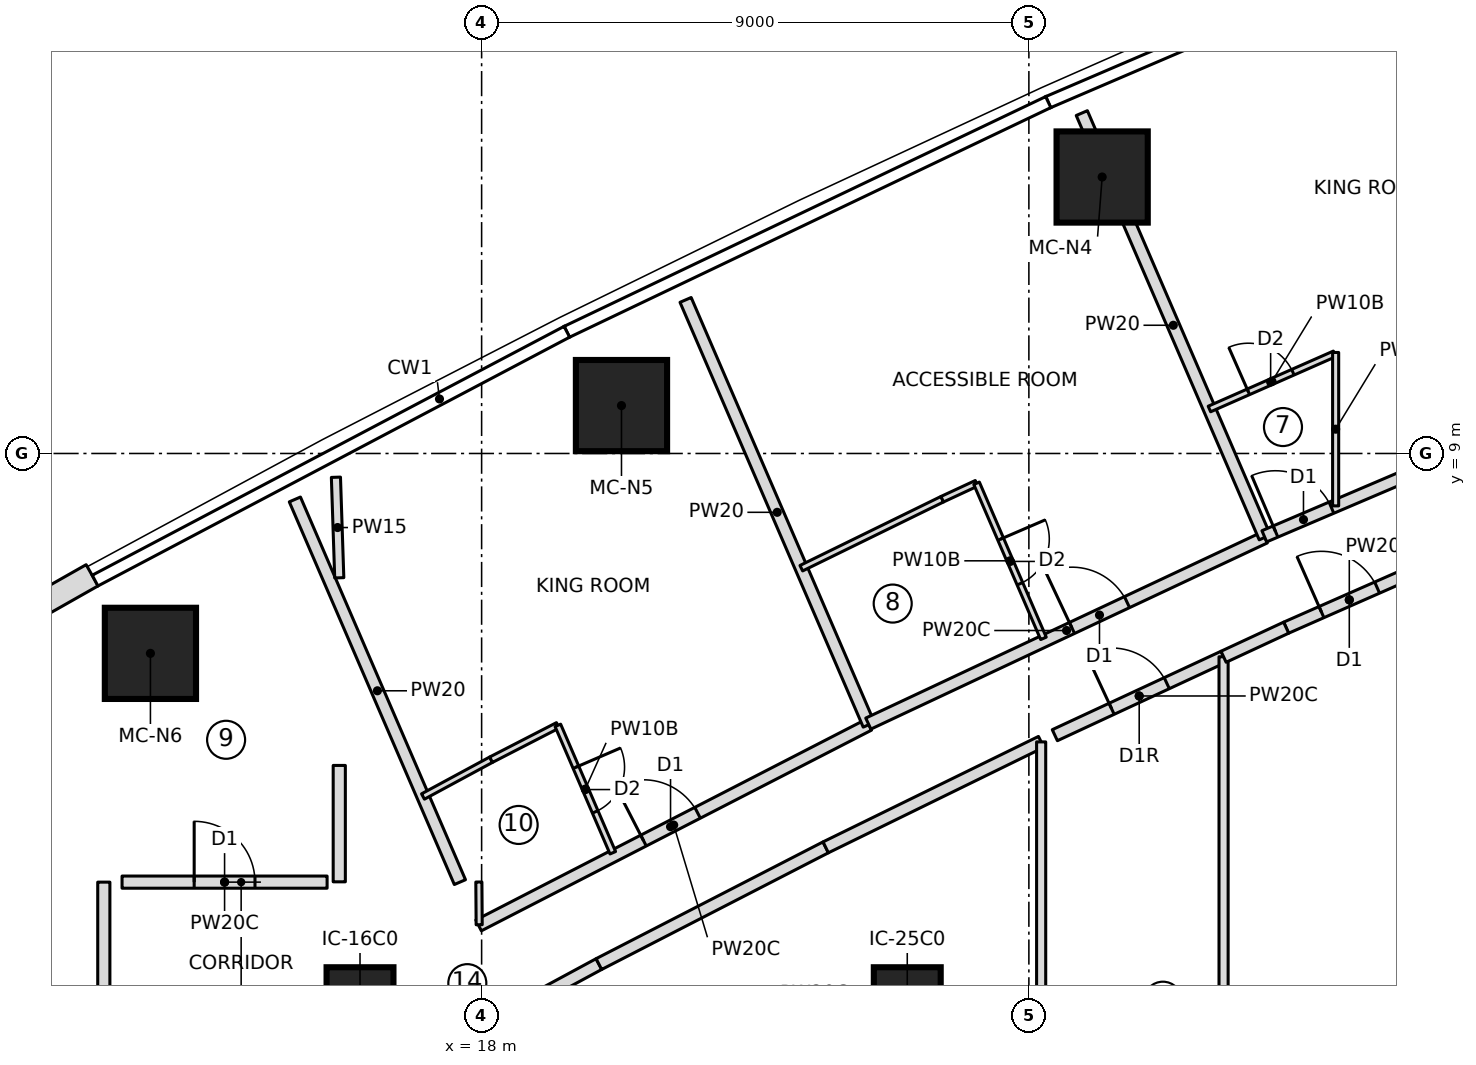
"""IFC4 building model, lengths in metres.
Left out: names, types, materials, properties, quantities, classifications, styles, units other than length and angle.
Written with IfcOpenShell. Run it as: python <this file> out.ifc"""

import sys

from ifc_helpers import new_model, si_unit, direction, frame, frame_2d, origin, origin_2d, place, context, subcontext, project, spatial, polyline, rectangle, outline, extrude, element, fill, save


model = new_model("IFC4")
c1 = context("Model", 3, precision=1e-05, world=origin(), true_north=direction((0.0, 1.0)))
c2 = subcontext(c1, "Body", "Model", "MODEL_VIEW")
j1 = project(units=[si_unit("LENGTHUNIT", "METRE"), si_unit("PLANEANGLEUNIT", "RADIAN")], contexts=[c1])
p1 = place(None, origin())
s1 = spatial("IfcSite", under=j1, at=p1, CompositionType="ELEMENT")
p2 = place(p1, origin())
s2 = spatial("IfcBuilding", under=s1, at=p2, CompositionType="ELEMENT")
p3 = place(p2, frame((0.0, 0.0, 137.3)))
s3 = spatial("IfcBuildingStorey", under=s2, at=p3, CompositionType="ELEMENT", Elevation=137.3)
for number, where, z_axis, x_axis in (
    (1, (28.205, 13.547, 0.0), (0.0, 0.0, 1.0), (1.0, 0.0, 0.0)),
    (2, (20.3, 9.788, 0.0), (0.0, 0.0, 1.0), (1.0, 0.0, 0.0)),
    (3, (12.553, 5.713, 0.0), (0.0, 0.0, 1.0), (1.0, 0.0, 0.0)),
):
    element("IfcColumn", number, at=place(p3, frame(where, z_axis=z_axis, x_axis=x_axis)), inside=s3, PredefinedType="COLUMN", context=c2, shape_type="SweptSolid", body=[
        extrude(rectangle(XDim=1.5, YDim=1.5, at=origin_2d()), origin(), (0.0, 0.0, 1.0), 3.55),
    ])
for number, where, z_axis, x_axis in (
    (4, (16.0, 0.0, 0.0), (0.0, 0.0, 1.0), (1.0, 0.0, 0.0)),
    (5, (25.0, 0.0, 0.0), (0.0, 0.0, 1.0), (1.0, 0.0, 0.0)),
):
    element("IfcColumn", number, at=place(p3, frame(where, z_axis=z_axis, x_axis=x_axis)), inside=s3, PredefinedType="COLUMN", context=c2, shape_type="SweptSolid", body=[
        extrude(rectangle(XDim=1.1, YDim=1.1, at=origin_2d()), origin(), (0.0, 0.0, 1.0), 3.55),
    ])
p4 = place(p3, frame((11.594, 6.997, 0.0), z_axis=(0.0, 0.0, 1.0), x_axis=(-0.870045255208, -0.492971859125, 0.0)))
e6 = element("IfcWall", 6, at=p4, inside=s3, PredefinedType="NOTDEFINED", context=c2, shape_type="SweptSolid", body=[
    extrude(outline(polyline([(0.0, -0.2), (4.424, -0.2), (4.352, 0.2), (0.0, 0.2), (0.0, -0.2)])), origin(), (0.0, 0.0, 1.0), 3.25),
])
p5 = place(p4, frame((1.094, 0.0, 0.6)))
e7 = element("IfcOpeningElement", 7, at=p5, cuts=e6, PredefinedType="OPENING", context=c2, shape_type="SweptSolid", body=[
    extrude(outline(polyline([(0.0, 1.35), (0.084, 1.771), (0.322, 2.128), (0.679, 2.366), (1.1, 2.45), (1.521, 2.366), (1.878, 2.128), (2.116, 1.771), (2.2, 1.35), (2.2, 1.1), (2.116, 0.679), (1.878, 0.322), (1.521, 0.084), (1.1, 0.0), (0.679, 0.084), (0.322, 0.322), (0.084, 0.679), (0.0, 1.1), (0.0, 1.35)])), frame((0.0, 0.21, 0.0), z_axis=(0.0, -1.0, 0.0), x_axis=(1.0, 0.0, 0.0)), (0.0, 0.0, 1.0), 0.42),
])
p6 = place(p3, frame((12.087, 1.95, 0.0), z_axis=(0.0, 0.0, 1.0), x_axis=(1.0, 0.0, 0.0)))
e8 = element("IfcWall", 8, at=p6, inside=s3, PredefinedType="PARTITIONING", context=c2, shape_type="SweptSolid", body=[
    extrude(rectangle(XDim=3.372, YDim=0.2, at=frame_2d((1.686, 0.0))), origin(), (0.0, 0.0, 1.0), 3.25),
])
p7 = place(p6, frame((1.186, 0.0, 0.0)))
e9 = element("IfcOpeningElement", 9, at=p7, cuts=e8, PredefinedType="OPENING", context=c2, shape_type="SweptSolid", body=[
    extrude(rectangle(XDim=1.0, YDim=2.1, at=frame_2d((0.5, 1.05))), frame((0.0, 0.11, 0.0), z_axis=(0.0, -1.0, 0.0), x_axis=(1.0, 0.0, 0.0)), (0.0, 0.0, 1.0), 0.22),
])
p8 = place(p3, frame((11.787, -1.95, 0.0), z_axis=(0.0, 0.0, 1.0), x_axis=(0.0, 1.0, 0.0)))
e10 = element("IfcWall", 10, at=p8, inside=s3, PredefinedType="PARTITIONING", context=c2, shape_type="SweptSolid", body=[
    extrude(rectangle(XDim=3.9, YDim=0.2, at=frame_2d((1.95, 0.0))), origin(), (0.0, 0.0, 1.0), 3.25),
])
p9 = place(p8, frame((0.4, 0.0, 0.0)))
e11 = element("IfcOpeningElement", 11, at=p9, cuts=e10, PredefinedType="OPENING", context=c2, shape_type="SweptSolid", body=[
    extrude(rectangle(XDim=1.0, YDim=2.1, at=frame_2d((0.5, 1.05))), frame((0.0, 0.11, 0.0), z_axis=(0.0, -1.0, 0.0), x_axis=(1.0, 0.0, 0.0)), (0.0, 0.0, 1.0), 0.22),
])
p10 = place(p3, frame((17.643, 1.95, 0.0), z_axis=(0.0, 0.0, 1.0), x_axis=(-0.395994543879, 0.918252863441, 0.0)))
e12 = element("IfcWall", 12, at=p10, inside=s3, PredefinedType="PARTITIONING", context=c2, shape_type="SweptSolid", body=[
    extrude(rectangle(XDim=6.854, YDim=0.2, at=frame_2d((3.427, 0.0))), origin(), (0.0, 0.0, 1.0), 3.25),
])
p11 = place(p3, frame((17.95, 1.238, 0.0), z_axis=(0.0, 0.0, 1.0), x_axis=(0.889253598622, 0.457414513694, 0.0)))
e13 = element("IfcWall", 13, at=p11, inside=s3, PredefinedType="PARTITIONING", context=c2, shape_type="SweptSolid", body=[
    extrude(rectangle(XDim=7.217, YDim=0.2, at=frame_2d((3.608, 0.0))), origin(), (0.0, 0.0, 1.0), 3.25),
])
p12 = place(p11, frame((3.05, 0.0, 0.0)))
e14 = element("IfcOpeningElement", 14, at=p12, cuts=e13, PredefinedType="OPENING", context=c2, shape_type="SweptSolid", body=[
    extrude(rectangle(XDim=1.0, YDim=2.1, at=frame_2d((0.5, 1.05))), frame((0.0, 0.11, 0.0), z_axis=(0.0, -1.0, 0.0), x_axis=(1.0, 0.0, 0.0)), (0.0, 0.0, 1.0), 0.22),
])
p13 = place(p3, frame((17.036, 3.358, 0.0), z_axis=(0.0, 0.0, 1.0), x_axis=(0.879823588489, 0.475300382009, 0.0)))
e15 = element("IfcWall", 15, at=p13, inside=s3, PredefinedType="PARTITIONING", context=c2, shape_type="SweptSolid", body=[
    extrude(rectangle(XDim=1.273, YDim=0.1, at=frame_2d((0.636, 0.0))), origin(), (0.0, 0.0, 1.0), 3.25),
])
p14 = place(p3, frame((18.156, 3.963, 0.0), z_axis=(0.0, 0.0, 1.0), x_axis=(0.889106231322, 0.457700895154, 0.0)))
e16 = element("IfcWall", 16, at=p14, inside=s3, PredefinedType="PARTITIONING", context=c2, shape_type="SweptSolid", body=[
    extrude(rectangle(XDim=1.235, YDim=0.1, at=frame_2d((0.617, 0.0))), origin(), (0.0, 0.0, 1.0), 3.25),
])
p15 = place(p3, frame((19.254, 4.529, 0.0), z_axis=(0.0, 0.0, 1.0), x_axis=(0.395958457437, -0.9182684248, 0.0)))
e17 = element("IfcWall", 17, at=p15, inside=s3, PredefinedType="PARTITIONING", context=c2, shape_type="SweptSolid", body=[
    extrude(rectangle(XDim=2.282, YDim=0.1, at=frame_2d((1.141, 0.0))), origin(), (0.0, 0.0, 1.0), 3.25),
])
p16 = place(p15, frame((0.75, 0.0, 0.0)))
e18 = element("IfcOpeningElement", 18, at=p16, cuts=e17, PredefinedType="OPENING", context=c2, shape_type="SweptSolid", body=[
    extrude(rectangle(XDim=0.8, YDim=2.1, at=frame_2d((0.4, 1.05))), frame((0.0, 0.06, 0.0), z_axis=(0.0, -1.0, 0.0), x_axis=(1.0, 0.0, 0.0)), (0.0, 0.0, 1.0), 0.12),
])
p17 = place(p3, frame((24.367, 4.539, 0.0), z_axis=(0.0, 0.0, 1.0), x_axis=(-0.395982367396, 0.918258114427, 0.0)))
e19 = element("IfcWall", 19, at=p17, inside=s3, PredefinedType="PARTITIONING", context=c2, shape_type="SweptSolid", body=[
    extrude(rectangle(XDim=7.609, YDim=0.2, at=frame_2d((3.804, 0.0))), origin(), (0.0, 0.0, 1.0), 3.25),
])
p18 = place(p3, frame((24.36, 4.557, 0.0), z_axis=(0.0, 0.0, 1.0), x_axis=(0.905157912263, 0.425075468439, 0.0)))
e20 = element("IfcWall", 20, at=p18, inside=s3, PredefinedType="PARTITIONING", context=c2, shape_type="SweptSolid", body=[
    extrude(rectangle(XDim=7.203, YDim=0.2, at=frame_2d((3.602, 0.0))), origin(), (0.0, 0.0, 1.0), 3.25),
])
p19 = place(p18, frame((3.7, 0.0, 0.0)))
e21 = element("IfcOpeningElement", 21, at=p19, cuts=e20, PredefinedType="OPENING", context=c2, shape_type="SweptSolid", body=[
    extrude(rectangle(XDim=1.0, YDim=2.1, at=frame_2d((0.5, 1.05))), frame((0.0, 0.11, 0.0), z_axis=(0.0, -1.0, 0.0), x_axis=(1.0, 0.0, 0.0)), (0.0, 0.0, 1.0), 0.22),
])
p20 = place(p3, frame((23.257, 7.113, 0.0), z_axis=(0.0, 0.0, 1.0), x_axis=(0.89814200952, 0.439705504555, 0.0)))
e22 = element("IfcWall", 22, at=p20, inside=s3, PredefinedType="PARTITIONING", context=c2, shape_type="SweptSolid", body=[
    extrude(rectangle(XDim=2.581, YDim=0.1, at=frame_2d((1.291, 0.0))), origin(), (0.0, 0.0, 1.0), 3.25),
])
p21 = place(p3, frame((25.575, 8.248, 0.0), z_axis=(0.0, 0.0, 1.0), x_axis=(0.906923333349, 0.421295700699, 0.0)))
e23 = element("IfcWall", 23, at=p21, inside=s3, PredefinedType="PARTITIONING", context=c2, shape_type="SweptSolid", body=[
    extrude(rectangle(XDim=0.622, YDim=0.1, at=frame_2d((0.311, 0.0))), origin(), (0.0, 0.0, 1.0), 3.25),
])
p22 = place(p3, frame((26.14, 8.51, 0.0), z_axis=(0.0, 0.0, 1.0), x_axis=(0.396018464604, -0.918242547311, 0.0)))
e24 = element("IfcWall", 24, at=p22, inside=s3, PredefinedType="PARTITIONING", context=c2, shape_type="SweptSolid", body=[
    extrude(rectangle(XDim=2.778, YDim=0.1, at=frame_2d((1.389, 0.0))), origin(), (0.0, 0.0, 1.0), 3.25),
])
p23 = place(p22, frame((1.0, 0.0, 0.0)))
e25 = element("IfcOpeningElement", 25, at=p23, cuts=e24, PredefinedType="OPENING", context=c2, shape_type="SweptSolid", body=[
    extrude(rectangle(XDim=0.8, YDim=2.1, at=frame_2d((0.4, 1.05))), frame((0.0, 0.06, 0.0), z_axis=(0.0, -1.0, 0.0), x_axis=(1.0, 0.0, 0.0)), (0.0, 0.0, 1.0), 0.12),
])
p24 = place(p3, frame((30.88, 7.619, 0.0), z_axis=(0.0, 0.0, 1.0), x_axis=(-0.395976934703, 0.91826045716, 0.0)))
e26 = element("IfcWall", 26, at=p24, inside=s3, PredefinedType="PARTITIONING", context=c2, shape_type="SweptSolid", body=[
    extrude(rectangle(XDim=7.6, YDim=0.2, at=frame_2d((3.8, 0.0))), origin(), (0.0, 0.0, 1.0), 3.25),
])
p25 = place(p3, frame((30.872, 7.638, 0.0), z_axis=(0.0, 0.0, 1.0), x_axis=(0.919834621271, 0.392306346509, 0.0)))
e27 = element("IfcWall", 27, at=p25, inside=s3, PredefinedType="PARTITIONING", context=c2, shape_type="SweptSolid", body=[
    extrude(rectangle(XDim=7.2, YDim=0.2, at=frame_2d((3.6, 0.0))), origin(), (0.0, 0.0, 1.0), 3.25),
])
p26 = place(p25, frame((0.2, 0.0, 0.0)))
e28 = element("IfcOpeningElement", 28, at=p26, cuts=e27, PredefinedType="OPENING", context=c2, shape_type="SweptSolid", body=[
    extrude(rectangle(XDim=1.0, YDim=2.1, at=frame_2d((0.5, 1.05))), frame((0.0, 0.11, 0.0), z_axis=(0.0, -1.0, 0.0), x_axis=(1.0, 0.0, 0.0)), (0.0, 0.0, 1.0), 0.22),
])
p27 = place(p3, frame((29.969, 9.731, 0.0), z_axis=(0.0, 0.0, 1.0), x_axis=(0.915118086658, 0.403185921719, 0.0)))
e29 = element("IfcWall", 29, at=p27, inside=s3, PredefinedType="PARTITIONING", context=c2, shape_type="SweptSolid", body=[
    extrude(rectangle(XDim=2.25, YDim=0.1, at=frame_2d((1.125, 0.0))), origin(), (0.0, 0.0, 1.0), 3.25),
])
p28 = place(p27, frame((0.7, 0.0, 0.0)))
e30 = element("IfcOpeningElement", 30, at=p28, cuts=e29, PredefinedType="OPENING", context=c2, shape_type="SweptSolid", body=[
    extrude(rectangle(XDim=0.8, YDim=2.1, at=frame_2d((0.4, 1.05))), frame((0.0, 0.06, 0.0), z_axis=(0.0, -1.0, 0.0), x_axis=(1.0, 0.0, 0.0)), (0.0, 0.0, 1.0), 0.12),
])
p29 = place(p3, frame((18.814, 0.0, 0.0), z_axis=(0.0, 0.0, 1.0), x_axis=(0.879832865766, 0.475283208538, 0.0)))
e31 = element("IfcWall", 31, at=p29, inside=s3, PredefinedType="PARTITIONING", context=c2, shape_type="SweptSolid", body=[
    extrude(rectangle(XDim=1.267, YDim=0.2, at=frame_2d((0.633, 0.0))), origin(), (0.0, 0.0, 1.0), 3.25),
])
p30 = place(p3, frame((19.928, 0.602, 0.0), z_axis=(0.0, 0.0, 1.0), x_axis=(0.889140337289, 0.457634636589, 0.0)))
e32 = element("IfcWall", 32, at=p30, inside=s3, PredefinedType="PARTITIONING", context=c2, shape_type="SweptSolid", body=[
    extrude(rectangle(XDim=4.195, YDim=0.2, at=frame_2d((2.098, 0.0))), origin(), (0.0, 0.0, 1.0), 3.25),
])
p31 = place(p3, frame((23.659, 2.522, 0.0), z_axis=(0.0, 0.0, 1.0), x_axis=(0.898146009837, 0.439697333418, 0.0)))
e33 = element("IfcWall", 33, at=p31, inside=s3, PredefinedType="PARTITIONING", context=c2, shape_type="SweptSolid", body=[
    extrude(rectangle(XDim=3.945, YDim=0.2, at=frame_2d((1.973, 0.0))), origin(), (0.0, 0.0, 1.0), 3.25),
])
p32 = place(p3, frame((27.202, -4.257, 0.0), z_axis=(0.0, 0.0, 1.0), x_axis=(0.0, 1.0, 0.0)))
e34 = element("IfcWall", 34, at=p32, inside=s3, PredefinedType="PARTITIONING", context=c2, shape_type="SweptSolid", body=[
    extrude(rectangle(XDim=8.513, YDim=0.15, at=frame_2d((4.257, 0.0))), origin(), (0.0, 0.0, 1.0), 3.25),
])
p33 = place(p3, frame((27.427, 4.367, 0.0), z_axis=(0.0, 0.0, 1.0), x_axis=(0.906842391635, 0.42146990015, 0.0)))
e35 = element("IfcWall", 35, at=p33, inside=s3, PredefinedType="PARTITIONING", context=c2, shape_type="SweptSolid", body=[
    extrude(rectangle(XDim=3.06, YDim=0.2, at=frame_2d((1.53, 0.0))), origin(), (0.0, 0.0, 1.0), 3.25),
])
p34 = place(p33, frame((1.03, 0.0, 0.0)))
e36 = element("IfcOpeningElement", 36, at=p34, cuts=e35, PredefinedType="OPENING", context=c2, shape_type="SweptSolid", body=[
    extrude(rectangle(XDim=1.0, YDim=2.1, at=frame_2d((0.5, 1.05))), frame((0.0, 0.11, 0.0), z_axis=(0.0, -1.0, 0.0), x_axis=(1.0, 0.0, 0.0)), (0.0, 0.0, 1.0), 0.22),
])
p35 = place(p3, frame((30.202, -5.656, 0.0), z_axis=(0.0, 0.0, 1.0), x_axis=(0.0, 1.0, 0.0)))
e37 = element("IfcWall", 37, at=p35, inside=s3, PredefinedType="PARTITIONING", context=c2, shape_type="SweptSolid", body=[
    extrude(rectangle(XDim=11.313, YDim=0.15, at=frame_2d((5.656, 0.0))), origin(), (0.0, 0.0, 1.0), 3.25),
])
p36 = place(p3, frame((31.231, 6.135, 0.0), z_axis=(0.0, 0.0, 1.0), x_axis=(0.915102334452, 0.403221672881, 0.0)))
e38 = element("IfcWall", 38, at=p36, inside=s3, PredefinedType="PARTITIONING", context=c2, shape_type="SweptSolid", body=[
    extrude(rectangle(XDim=2.269, YDim=0.2, at=frame_2d((1.135, 0.0))), origin(), (0.0, 0.0, 1.0), 3.25),
])
p37 = place(p36, frame((0.635, 0.0, 0.0)))
e39 = element("IfcOpeningElement", 39, at=p37, cuts=e38, PredefinedType="OPENING", context=c2, shape_type="SweptSolid", body=[
    extrude(rectangle(XDim=1.0, YDim=2.1, at=frame_2d((0.5, 1.05))), frame((0.0, 0.11, 0.0), z_axis=(0.0, -1.0, 0.0), x_axis=(1.0, 0.0, 0.0)), (0.0, 0.0, 1.0), 0.22),
])
p38 = place(p3, frame((30.202, 5.656, 0.0), z_axis=(0.0, 0.0, 1.0), x_axis=(0.906797605575, 0.421566249271, 0.0)))
e40 = element("IfcWall", 40, at=p38, inside=s3, PredefinedType="PARTITIONING", context=c2, shape_type="SweptSolid", body=[
    extrude(rectangle(XDim=1.135, YDim=0.2, at=frame_2d((0.567, 0.0))), origin(), (0.0, 0.0, 1.0), 3.25),
])
p39 = place(p3, frame((15.604, 8.609, 0.0), z_axis=(0.0, 0.0, 1.0), x_axis=(0.033196927484, -0.999448830109, 0.0)))
e41 = element("IfcWall", 41, at=p39, inside=s3, PredefinedType="PARTITIONING", context=c2, shape_type="SweptSolid", body=[
    extrude(rectangle(XDim=1.655, YDim=0.15, at=frame_2d((0.827, 0.0))), origin(), (0.0, 0.0, 1.0), 3.25),
])
p40 = place(p3, frame((17.96, 1.249, 0.0), z_axis=(0.0, 0.0, 1.0), x_axis=(-0.007291472831, 0.999973416859, 0.0)))
e42 = element("IfcWall", 42, at=p40, inside=s3, PredefinedType="PARTITIONING", context=c2, shape_type="SweptSolid", body=[
    extrude(rectangle(XDim=0.703, YDim=0.1, at=frame_2d((0.352, 0.0))), origin(), (0.0, 0.0, 1.0), 3.25),
])
p41 = place(p3, frame((32.045, 10.661, 0.0), z_axis=(0.0, 0.0, 1.0), x_axis=(0.0, -1.0, 0.0)))
e43 = element("IfcWall", 43, at=p41, inside=s3, PredefinedType="PARTITIONING", context=c2, shape_type="SweptSolid", body=[
    extrude(rectangle(XDim=2.523, YDim=0.1, at=frame_2d((1.261, 0.0))), origin(), (0.0, 0.0, 1.0), 3.25),
])
p42 = place(p3, frame((15.659, 3.869, 0.0), z_axis=(0.0, 0.0, 1.0), x_axis=(0.0, -1.0, 0.0)))
e44 = element("IfcWall", 44, at=p42, inside=s3, PredefinedType="PARTITIONING", context=c2, shape_type="SweptSolid", body=[
    extrude(rectangle(XDim=1.914, YDim=0.2, at=frame_2d((0.957, 0.0))), origin(), (0.0, 0.0, 1.0), 3.25),
])
p43 = place(p7, origin())
e45 = element("IfcDoor", 45, at=p43, inside=s3, OperationType="SINGLE_SWING_LEFT", PredefinedType="DOOR", context=c2, shape_type="SweptSolid", body=[
    extrude(rectangle(XDim=1.0, YDim=2.1, at=frame_2d((0.5, 1.05))), frame((0.0, 0.025, 0.0), z_axis=(0.0, -1.0, 0.0), x_axis=(1.0, 0.0, 0.0)), (0.0, 0.0, 1.0), 0.05),
])
fill(e9, e45)
p44 = place(p16, origin())
e46 = element("IfcDoor", 46, at=p44, inside=s3, OperationType="SINGLE_SWING_LEFT", PredefinedType="DOOR", context=c2, shape_type="SweptSolid", body=[
    extrude(rectangle(XDim=0.8, YDim=2.1, at=frame_2d((0.4, 1.05))), frame((0.0, 0.025, 0.0), z_axis=(0.0, -1.0, 0.0), x_axis=(1.0, 0.0, 0.0)), (0.0, 0.0, 1.0), 0.05),
])
fill(e18, e46)
p45 = place(p12, origin())
e47 = element("IfcDoor", 47, at=p45, inside=s3, OperationType="SINGLE_SWING_LEFT", PredefinedType="DOOR", context=c2, shape_type="SweptSolid", body=[
    extrude(rectangle(XDim=1.0, YDim=2.1, at=frame_2d((0.5, 1.05))), frame((0.0, 0.025, 0.0), z_axis=(0.0, -1.0, 0.0), x_axis=(1.0, 0.0, 0.0)), (0.0, 0.0, 1.0), 0.05),
])
fill(e14, e47)
p46 = place(p23, origin())
e48 = element("IfcDoor", 48, at=p46, inside=s3, OperationType="SINGLE_SWING_LEFT", PredefinedType="DOOR", context=c2, shape_type="SweptSolid", body=[
    extrude(rectangle(XDim=0.8, YDim=2.1, at=frame_2d((0.4, 1.05))), frame((0.0, 0.025, 0.0), z_axis=(0.0, -1.0, 0.0), x_axis=(1.0, 0.0, 0.0)), (0.0, 0.0, 1.0), 0.05),
])
fill(e25, e48)
p47 = place(p19, origin())
e49 = element("IfcDoor", 49, at=p47, inside=s3, OperationType="SINGLE_SWING_LEFT", PredefinedType="DOOR", context=c2, shape_type="SweptSolid", body=[
    extrude(rectangle(XDim=1.0, YDim=2.1, at=frame_2d((0.5, 1.05))), frame((0.0, 0.025, 0.0), z_axis=(0.0, -1.0, 0.0), x_axis=(1.0, 0.0, 0.0)), (0.0, 0.0, 1.0), 0.05),
])
fill(e21, e49)
p48 = place(p28, origin())
e50 = element("IfcDoor", 50, at=p48, inside=s3, OperationType="SINGLE_SWING_LEFT", PredefinedType="DOOR", context=c2, shape_type="SweptSolid", body=[
    extrude(rectangle(XDim=0.8, YDim=2.1, at=frame_2d((0.4, 1.05))), frame((0.0, 0.025, 0.0), z_axis=(0.0, -1.0, 0.0), x_axis=(1.0, 0.0, 0.0)), (0.0, 0.0, 1.0), 0.05),
])
fill(e30, e50)
p49 = place(p26, origin())
e51 = element("IfcDoor", 51, at=p49, inside=s3, OperationType="SINGLE_SWING_LEFT", PredefinedType="DOOR", context=c2, shape_type="SweptSolid", body=[
    extrude(rectangle(XDim=1.0, YDim=2.1, at=frame_2d((0.5, 1.05))), frame((0.0, 0.025, 0.0), z_axis=(0.0, -1.0, 0.0), x_axis=(1.0, 0.0, 0.0)), (0.0, 0.0, 1.0), 0.05),
])
fill(e28, e51)
p50 = place(p34, origin())
e52 = element("IfcDoor", 52, at=p50, inside=s3, OperationType="SINGLE_SWING_RIGHT", PredefinedType="DOOR", context=c2, shape_type="SweptSolid", body=[
    extrude(rectangle(XDim=1.0, YDim=2.1, at=frame_2d((0.5, 1.05))), frame((0.0, 0.025, 0.0), z_axis=(0.0, -1.0, 0.0), x_axis=(1.0, 0.0, 0.0)), (0.0, 0.0, 1.0), 0.05),
])
fill(e36, e52)
p51 = place(p37, origin())
e53 = element("IfcDoor", 53, at=p51, inside=s3, OperationType="SINGLE_SWING_LEFT", PredefinedType="DOOR", context=c2, shape_type="SweptSolid", body=[
    extrude(rectangle(XDim=1.0, YDim=2.1, at=frame_2d((0.5, 1.05))), frame((0.0, 0.025, 0.0), z_axis=(0.0, -1.0, 0.0), x_axis=(1.0, 0.0, 0.0)), (0.0, 0.0, 1.0), 0.05),
])
fill(e39, e53)
save(model, sys.argv[1])
